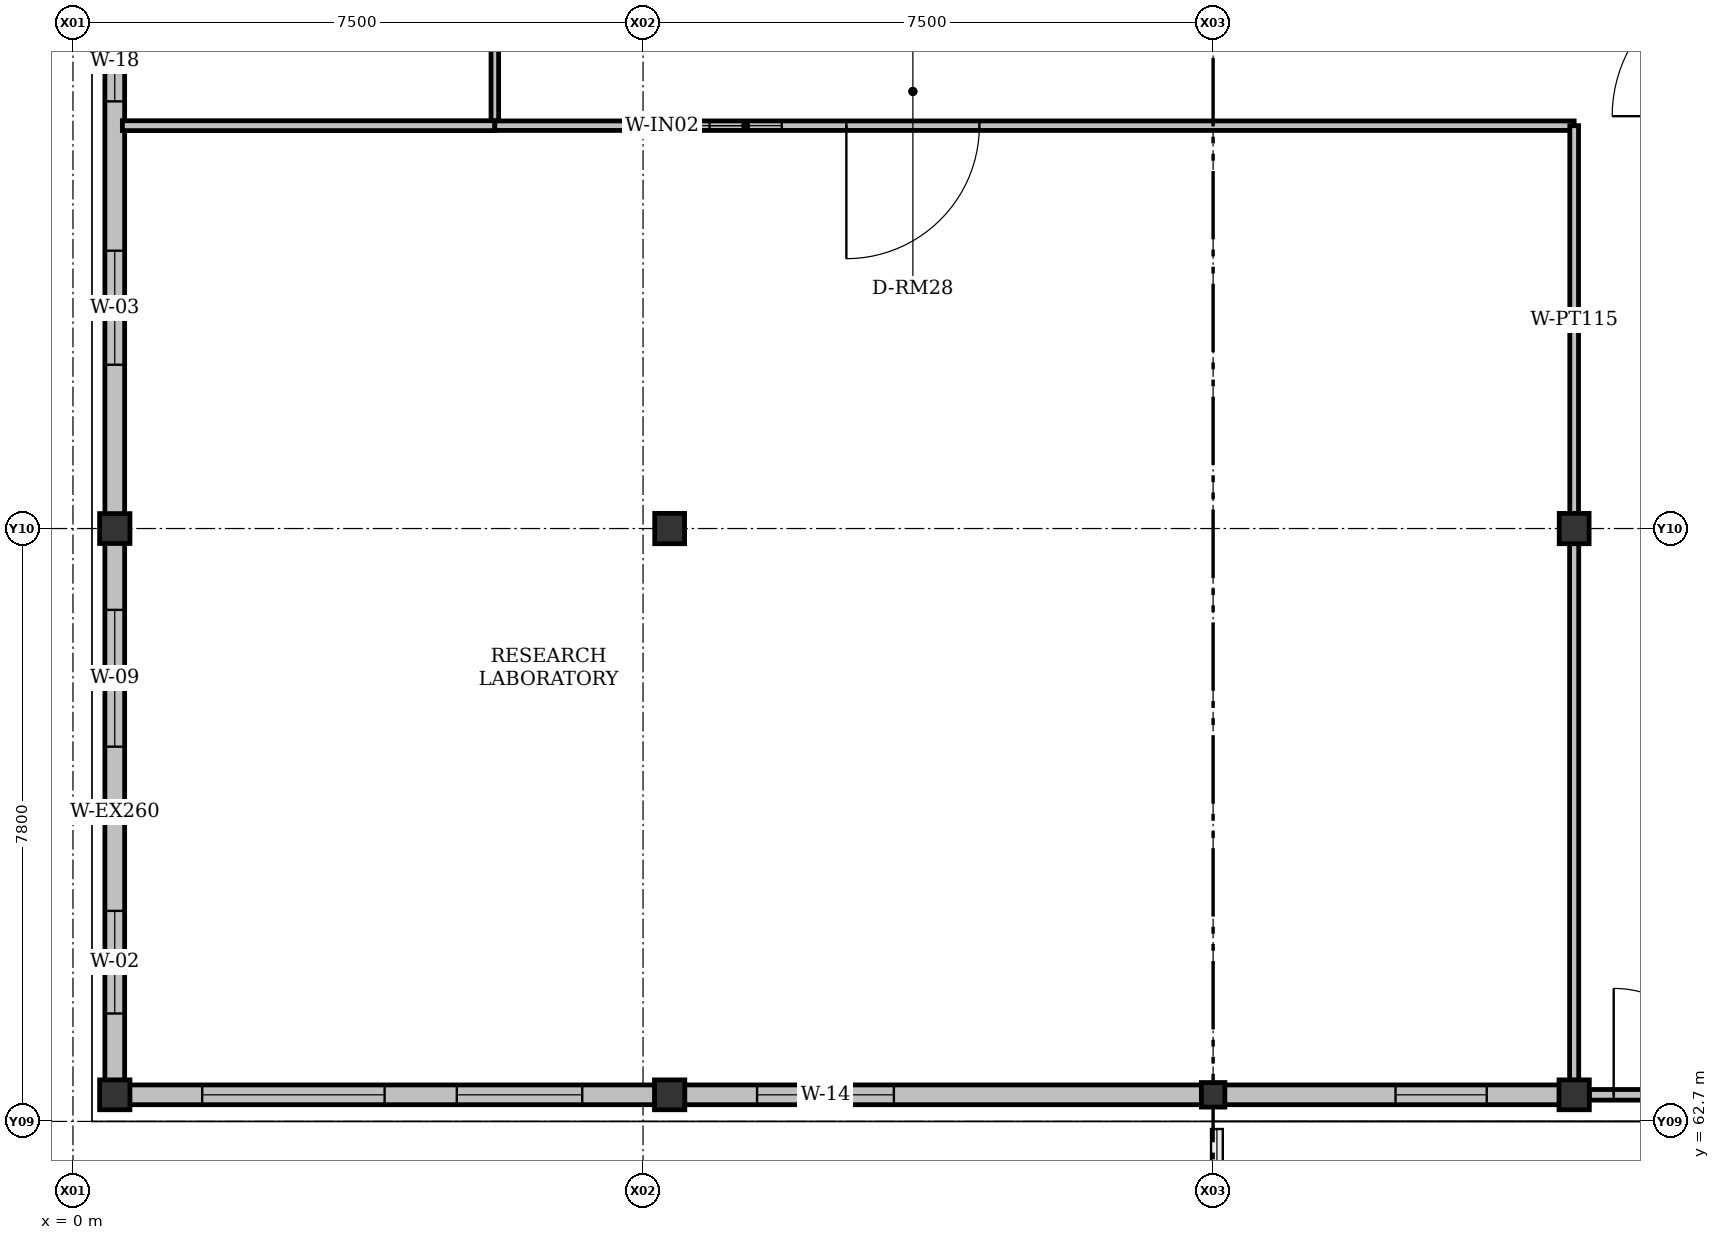
"""IFC4 building model, lengths in metres.
Left out: names, types, materials, properties, quantities, classifications, styles, units other than length and angle.
Written with IfcOpenShell. Run it as: python <this file> out.ifc"""

import sys

from ifc_helpers import new_model, si_unit, direction, frame, frame_2d, origin, origin_2d, place, context, subcontext, project, spatial, rectangle, i_section, extrude, element, fill, save


model = new_model("IFC4")
c1 = context("Model", 3, precision=1e-05, world=origin(), true_north=direction((0.0, 1.0)))
c2 = subcontext(c1, "Body", "Model", "MODEL_VIEW")
j1 = project(units=[si_unit("LENGTHUNIT", "METRE"), si_unit("PLANEANGLEUNIT", "RADIAN")], contexts=[c1])
p1 = place(None, origin())
s1 = spatial("IfcSite", under=j1, at=p1, CompositionType="ELEMENT")
p2 = place(p1, origin())
s2 = spatial("IfcBuilding", under=s1, at=p2, CompositionType="ELEMENT")
p3 = place(p2, frame((0.0, 0.0, 5.4)))
s3 = spatial("IfcBuildingStorey", under=s2, at=p3, CompositionType="ELEMENT", Elevation=5.4)
for number, where, z_axis, x_axis in (
    (1, (0.55, 63.05, 0.0), (0.0, 0.0, 1.0), (1.0, 0.0, 0.0)),
    (2, (7.85, 63.05, 0.0), (0.0, 0.0, 1.0), (1.0, 0.0, 0.0)),
    (3, (19.75, 63.05, 0.0), (0.0, 0.0, 1.0), (1.0, 0.0, 0.0)),
    (4, (0.55, 70.5, 0.0), (0.0, 0.0, 1.0), (1.0, 0.0, 0.0)),
    (5, (7.85, 70.5, 0.0), (0.0, 0.0, 1.0), (0.0, 1.0, 0.0)),
    (6, (19.75, 70.5, 0.0), (0.0, 0.0, 1.0), (0.0, 1.0, 0.0)),
):
    element("IfcColumn", number, at=place(p3, frame(where, z_axis=z_axis, x_axis=x_axis)), inside=s3, PredefinedType="COLUMN", context=c2, shape_type="SweptSolid", body=[
        extrude(i_section(OverallWidth=0.399, OverallDepth=0.393, WebThickness=0.023, FlangeThickness=0.036, FilletRadius=0.015, at=origin_2d()), origin(), (0.0, 0.0, 1.0), 4.5),
    ])
p4 = place(p3, frame((15.0, 63.05, 0.0), z_axis=(0.0, 0.0, 1.0), x_axis=(1.0, 0.0, 0.0)))
e7 = element("IfcColumn", 7, at=p4, inside=s3, PredefinedType="COLUMN", context=c2, shape_type="SweptSolid", body=[
    extrude(i_section(OverallWidth=0.309, OverallDepth=0.323, WebThickness=0.014, FlangeThickness=0.023, FilletRadius=0.015, at=origin_2d()), origin(), (0.0, 0.0, 1.0), 4.5),
])
p5 = place(p3, frame((0.55, 63.05, 0.0), z_axis=(0.0, 0.0, 1.0), x_axis=(0.0, 1.0, 0.0)))
e8 = element("IfcWall", 8, at=p5, inside=s3, PredefinedType="SOLIDWALL", context=c2, shape_type="SweptSolid", body=[
    extrude(rectangle(XDim=7.45, YDim=0.26, at=frame_2d((3.725, 0.0))), origin(), (0.0, 0.0, 1.0), 3.847),
])
p6 = place(p5, frame((1.07, 0.0, 0.92)))
e9 = element("IfcOpeningElement", 9, at=p6, cuts=e8, PredefinedType="OPENING", context=c2, shape_type="SweptSolid", body=[
    extrude(rectangle(XDim=1.35, YDim=1.4, at=frame_2d((0.675, 0.7))), frame((0.0, 0.13, 0.0), z_axis=(0.0, -1.0, 0.0), x_axis=(1.0, 0.0, 0.0)), (0.0, 0.0, 1.0), 0.26),
])
p7 = place(p5, frame((4.58, 0.0, 0.92)))
e10 = element("IfcOpeningElement", 10, at=p7, cuts=e8, PredefinedType="OPENING", context=c2, shape_type="SweptSolid", body=[
    extrude(rectangle(XDim=1.8, YDim=1.55, at=frame_2d((0.9, 0.775))), frame((0.0, 0.13, 0.0), z_axis=(0.0, -1.0, 0.0), x_axis=(1.0, 0.0, 0.0)), (0.0, 0.0, 1.0), 0.26),
])
p8 = place(p3, frame((0.55, 70.5, 0.0), z_axis=(0.0, 0.0, 1.0), x_axis=(0.0, 1.0, 0.0)))
e11 = element("IfcWall", 11, at=p8, inside=s3, PredefinedType="SOLIDWALL", context=c2, shape_type="SweptSolid", body=[
    extrude(rectangle(XDim=7.5, YDim=0.26, at=frame_2d((3.75, 0.0))), origin(), (0.0, 0.0, 1.0), 3.847),
])
p9 = place(p8, frame((2.155, 0.0, 0.92)))
e12 = element("IfcOpeningElement", 12, at=p9, cuts=e11, PredefinedType="OPENING", context=c2, shape_type="SweptSolid", body=[
    extrude(rectangle(XDim=1.5, YDim=1.4, at=frame_2d((0.75, 0.7))), frame((0.0, 0.13, 0.0), z_axis=(0.0, -1.0, 0.0), x_axis=(1.0, 0.0, 0.0)), (0.0, 0.0, 1.0), 0.26),
])
p10 = place(p8, frame((5.62, 0.0, 0.92)))
e13 = element("IfcOpeningElement", 13, at=p10, cuts=e11, PredefinedType="OPENING", context=c2, shape_type="SweptSolid", body=[
    extrude(rectangle(XDim=1.05, YDim=1.3, at=frame_2d((0.525, 0.65))), frame((0.0, 0.13, 0.0), z_axis=(0.0, -1.0, 0.0), x_axis=(1.0, 0.0, 0.0)), (0.0, 0.0, 1.0), 0.26),
])
p11 = place(p3, frame((7.85, 63.05, 0.0), z_axis=(0.0, 0.0, 1.0), x_axis=(-1.0, 0.0, 0.0)))
e14 = element("IfcWall", 14, at=p11, inside=s3, PredefinedType="SOLIDWALL", context=c2, shape_type="SweptSolid", body=[
    extrude(rectangle(XDim=7.3, YDim=0.26, at=frame_2d((3.65, 0.0))), origin(), (0.0, 0.0, 1.0), 3.847),
])
p12 = place(p11, frame((1.15, 0.0, 0.92)))
e15 = element("IfcOpeningElement", 15, at=p12, cuts=e14, PredefinedType="OPENING", context=c2, shape_type="SweptSolid", body=[
    extrude(rectangle(XDim=1.65, YDim=1.4, at=frame_2d((0.825, 0.7))), frame((0.0, 0.13, 0.0), z_axis=(0.0, -1.0, 0.0), x_axis=(1.0, 0.0, 0.0)), (0.0, 0.0, 1.0), 0.26),
])
p13 = place(p11, frame((3.75, 0.0, 0.92)))
e16 = element("IfcOpeningElement", 16, at=p13, cuts=e14, PredefinedType="OPENING", context=c2, shape_type="SweptSolid", body=[
    extrude(rectangle(XDim=2.4, YDim=1.55, at=frame_2d((1.2, 0.775))), frame((0.0, 0.13, 0.0), z_axis=(0.0, -1.0, 0.0), x_axis=(1.0, 0.0, 0.0)), (0.0, 0.0, 1.0), 0.26),
])
p14 = place(p3, frame((19.75, 63.05, 0.0), z_axis=(0.0, 0.0, 1.0), x_axis=(-1.0, 0.0, 0.0)))
e17 = element("IfcWall", 17, at=p14, inside=s3, PredefinedType="SOLIDWALL", context=c2, shape_type="SweptSolid", body=[
    extrude(rectangle(XDim=11.9, YDim=0.26, at=frame_2d((5.95, 0.0))), origin(), (0.0, 0.0, 1.0), 3.847),
])
p15 = place(p14, frame((1.15, 0.0, 0.92)))
e18 = element("IfcOpeningElement", 18, at=p15, cuts=e17, PredefinedType="OPENING", context=c2, shape_type="SweptSolid", body=[
    extrude(rectangle(XDim=1.2, YDim=1.55, at=frame_2d((0.6, 0.775))), frame((0.0, 0.13, 0.0), z_axis=(0.0, -1.0, 0.0), x_axis=(1.0, 0.0, 0.0)), (0.0, 0.0, 1.0), 0.26),
])
p16 = place(p14, frame((8.95, 0.0, 0.92)))
e19 = element("IfcOpeningElement", 19, at=p16, cuts=e17, PredefinedType="OPENING", context=c2, shape_type="SweptSolid", body=[
    extrude(rectangle(XDim=1.8, YDim=1.7, at=frame_2d((0.9, 0.85))), frame((0.0, 0.13, 0.0), z_axis=(0.0, -1.0, 0.0), x_axis=(1.0, 0.0, 0.0)), (0.0, 0.0, 1.0), 0.26),
])
p17 = place(p3, frame((5.55, 75.8, 0.0), z_axis=(0.0, 0.0, 1.0), x_axis=(0.0, 1.0, 0.0)))
e20 = element("IfcWall", 20, at=p17, inside=s3, PredefinedType="PARTITIONING", context=c2, shape_type="SweptSolid", body=[
    extrude(rectangle(XDim=27.8, YDim=0.1, at=frame_2d((13.9, 0.0))), origin(), (0.0, 0.0, 1.0), 3.721),
])
p18 = place(p17, frame((13.26, 0.0, 0.0)))
e21 = element("IfcOpeningElement", 21, at=p18, cuts=e20, PredefinedType="OPENING", context=c2, shape_type="SweptSolid", body=[
    extrude(rectangle(XDim=1.28, YDim=2.25, at=frame_2d((0.64, 1.125))), frame((0.0, 0.05, 0.0), z_axis=(0.0, -1.0, 0.0), x_axis=(1.0, 0.0, 0.0)), (0.0, 0.0, 1.0), 0.1),
])
p19 = place(p17, frame((15.39, 0.0, 0.92)))
e22 = element("IfcOpeningElement", 22, at=p19, cuts=e20, PredefinedType="OPENING", context=c2, shape_type="SweptSolid", body=[
    extrude(rectangle(XDim=1.45, YDim=1.3, at=frame_2d((0.725, 0.65))), frame((0.0, 0.05, 0.0), z_axis=(0.0, -1.0, 0.0), x_axis=(1.0, 0.0, 0.0)), (0.0, 0.0, 1.0), 0.1),
])
p20 = place(p3, frame((19.95, 63.05, 0.0), z_axis=(0.0, 0.0, 1.0), x_axis=(1.0, 0.0, 0.0)))
e23 = element("IfcWall", 23, at=p20, inside=s3, PredefinedType="PARTITIONING", context=c2, shape_type="SweptSolid", body=[
    extrude(rectangle(XDim=2.04, YDim=0.14, at=frame_2d((1.02, 0.0))), origin(), (0.0, 0.0, 1.0), 3.847),
])
p21 = place(p20, frame((0.32, 0.0, 0.0)))
e24 = element("IfcOpeningElement", 24, at=p21, cuts=e23, PredefinedType="OPENING", context=c2, shape_type="SweptSolid", body=[
    extrude(rectangle(XDim=1.4, YDim=2.25, at=frame_2d((0.7, 1.125))), frame((0.0, 0.07, 0.0), z_axis=(0.0, -1.0, 0.0), x_axis=(1.0, 0.0, 0.0)), (0.0, 0.0, 1.0), 0.14),
])
p22 = place(p3, frame((0.65, 75.8, 0.0), z_axis=(0.0, 0.0, 1.0), x_axis=(1.0, 0.0, 0.0)))
e25 = element("IfcWall", 25, at=p22, inside=s3, PredefinedType="PARTITIONING", context=c2, shape_type="SweptSolid", body=[
    extrude(rectangle(XDim=4.9, YDim=0.13, at=frame_2d((2.45, 0.0))), origin(), (0.0, 0.0, 1.0), 4.25),
])
p23 = place(p3, frame((19.75, 75.8, 0.0), z_axis=(0.0, 0.0, 1.0), x_axis=(-1.0, 0.0, 0.0)))
e26 = element("IfcWall", 26, at=p23, inside=s3, PredefinedType="PARTITIONING", context=c2, shape_type="SweptSolid", body=[
    extrude(rectangle(XDim=14.2, YDim=0.125, at=frame_2d((7.1, 0.0))), origin(), (0.0, 0.0, 1.0), 3.797),
])
p24 = place(p23, frame((7.825, 0.0, 0.0)))
e27 = element("IfcOpeningElement", 27, at=p24, cuts=e26, PredefinedType="OPENING", context=c2, shape_type="SweptSolid", body=[
    extrude(rectangle(XDim=1.75, YDim=2.35, at=frame_2d((0.875, 1.175))), frame((0.0, 0.062, 0.0), z_axis=(0.0, -1.0, 0.0), x_axis=(1.0, 0.0, 0.0)), (0.0, 0.0, 1.0), 0.125),
])
p25 = place(p23, frame((10.425, 0.0, 0.92)))
e28 = element("IfcOpeningElement", 28, at=p25, cuts=e26, PredefinedType="OPENING", context=c2, shape_type="SweptSolid", body=[
    extrude(rectangle(XDim=0.95, YDim=1.1, at=frame_2d((0.475, 0.55))), frame((0.0, 0.062, 0.0), z_axis=(0.0, -1.0, 0.0), x_axis=(1.0, 0.0, 0.0)), (0.0, 0.0, 1.0), 0.125),
])
p26 = place(p3, frame((19.75, 63.241, 0.0), z_axis=(0.0, 0.0, 1.0), x_axis=(0.0, 1.0, 0.0)))
e29 = element("IfcWall", 29, at=p26, inside=s3, PredefinedType="PARTITIONING", context=c2, shape_type="SweptSolid", body=[
    extrude(rectangle(XDim=7.064, YDim=0.12, at=frame_2d((3.532, 0.0))), origin(), (0.0, 0.0, 1.0), 3.797),
])
p27 = place(p3, frame((19.75, 70.695, 0.0), z_axis=(0.0, 0.0, 1.0), x_axis=(0.0, 1.0, 0.0)))
e30 = element("IfcWall", 30, at=p27, inside=s3, PredefinedType="PARTITIONING", context=c2, shape_type="SweptSolid", body=[
    extrude(rectangle(XDim=5.105, YDim=0.115, at=frame_2d((2.553, 0.0))), origin(), (0.0, 0.0, 1.0), 3.797),
])
p28 = place(p6, origin())
e31 = element("IfcWindow", 31, at=p28, inside=s3, PartitioningType="SINGLE_PANEL", PredefinedType="WINDOW", context=c2, shape_type="SweptSolid", body=[
    extrude(rectangle(XDim=1.35, YDim=1.4, at=frame_2d((0.675, 0.7))), frame((0.0, 0.03, 0.0), z_axis=(0.0, -1.0, 0.0), x_axis=(1.0, 0.0, 0.0)), (0.0, 0.0, 1.0), 0.06),
])
fill(e9, e31)
p29 = place(p7, origin())
e32 = element("IfcWindow", 32, at=p29, inside=s3, PartitioningType="DOUBLE_PANEL_VERTICAL", PredefinedType="WINDOW", context=c2, shape_type="SweptSolid", body=[
    extrude(rectangle(XDim=1.8, YDim=1.55, at=frame_2d((0.9, 0.775))), frame((0.0, 0.03, 0.0), z_axis=(0.0, -1.0, 0.0), x_axis=(1.0, 0.0, 0.0)), (0.0, 0.0, 1.0), 0.06),
])
fill(e10, e32)
p30 = place(p9, origin())
e33 = element("IfcWindow", 33, at=p30, inside=s3, PartitioningType="SINGLE_PANEL", PredefinedType="WINDOW", context=c2, shape_type="SweptSolid", body=[
    extrude(rectangle(XDim=1.5, YDim=1.4, at=frame_2d((0.75, 0.7))), frame((0.0, 0.03, 0.0), z_axis=(0.0, -1.0, 0.0), x_axis=(1.0, 0.0, 0.0)), (0.0, 0.0, 1.0), 0.06),
])
fill(e12, e33)
p31 = place(p10, origin())
e34 = element("IfcWindow", 34, at=p31, inside=s3, PartitioningType="SINGLE_PANEL", PredefinedType="WINDOW", context=c2, shape_type="SweptSolid", body=[
    extrude(rectangle(XDim=1.05, YDim=1.3, at=frame_2d((0.525, 0.65))), frame((0.0, 0.03, 0.0), z_axis=(0.0, -1.0, 0.0), x_axis=(1.0, 0.0, 0.0)), (0.0, 0.0, 1.0), 0.06),
])
fill(e13, e34)
p32 = place(p12, origin())
e35 = element("IfcWindow", 35, at=p32, inside=s3, PartitioningType="DOUBLE_PANEL_VERTICAL", PredefinedType="WINDOW", context=c2, shape_type="SweptSolid", body=[
    extrude(rectangle(XDim=1.65, YDim=1.4, at=frame_2d((0.825, 0.7))), frame((0.0, 0.03, 0.0), z_axis=(0.0, -1.0, 0.0), x_axis=(1.0, 0.0, 0.0)), (0.0, 0.0, 1.0), 0.06),
])
fill(e15, e35)
p33 = place(p13, origin())
e36 = element("IfcWindow", 36, at=p33, inside=s3, PartitioningType="DOUBLE_PANEL_VERTICAL", PredefinedType="WINDOW", context=c2, shape_type="SweptSolid", body=[
    extrude(rectangle(XDim=2.4, YDim=1.55, at=frame_2d((1.2, 0.775))), frame((0.0, 0.03, 0.0), z_axis=(0.0, -1.0, 0.0), x_axis=(1.0, 0.0, 0.0)), (0.0, 0.0, 1.0), 0.06),
])
fill(e16, e36)
p34 = place(p15, origin())
e37 = element("IfcWindow", 37, at=p34, inside=s3, PartitioningType="SINGLE_PANEL", PredefinedType="WINDOW", context=c2, shape_type="SweptSolid", body=[
    extrude(rectangle(XDim=1.2, YDim=1.55, at=frame_2d((0.6, 0.775))), frame((0.0, 0.03, 0.0), z_axis=(0.0, -1.0, 0.0), x_axis=(1.0, 0.0, 0.0)), (0.0, 0.0, 1.0), 0.06),
])
fill(e18, e37)
p35 = place(p16, origin())
e38 = element("IfcWindow", 38, at=p35, inside=s3, PartitioningType="DOUBLE_PANEL_VERTICAL", PredefinedType="WINDOW", context=c2, shape_type="SweptSolid", body=[
    extrude(rectangle(XDim=1.8, YDim=1.7, at=frame_2d((0.9, 0.85))), frame((0.0, 0.03, 0.0), z_axis=(0.0, -1.0, 0.0), x_axis=(1.0, 0.0, 0.0)), (0.0, 0.0, 1.0), 0.06),
])
fill(e19, e38)
p36 = place(p21, origin())
e39 = element("IfcDoor", 39, at=p36, inside=s3, OperationType="SINGLE_SWING_LEFT", PredefinedType="DOOR", context=c2, shape_type="SweptSolid", body=[
    extrude(rectangle(XDim=1.4, YDim=2.25, at=frame_2d((0.7, 1.125))), frame((0.0, 0.025, 0.0), z_axis=(0.0, -1.0, 0.0), x_axis=(1.0, 0.0, 0.0)), (0.0, 0.0, 1.0), 0.05),
])
fill(e24, e39)
p37 = place(p24, origin())
e40 = element("IfcDoor", 40, at=p37, inside=s3, OperationType="SINGLE_SWING_RIGHT", PredefinedType="DOOR", context=c2, shape_type="SweptSolid", body=[
    extrude(rectangle(XDim=1.75, YDim=2.35, at=frame_2d((0.875, 1.175))), frame((0.0, 0.025, 0.0), z_axis=(0.0, -1.0, 0.0), x_axis=(1.0, 0.0, 0.0)), (0.0, 0.0, 1.0), 0.05),
])
fill(e27, e40)
p38 = place(p25, origin())
e41 = element("IfcWindow", 41, at=p38, inside=s3, PartitioningType="SINGLE_PANEL", PredefinedType="WINDOW", context=c2, shape_type="SweptSolid", body=[
    extrude(rectangle(XDim=0.95, YDim=1.1, at=frame_2d((0.475, 0.55))), frame((0.0, 0.03, 0.0), z_axis=(0.0, -1.0, 0.0), x_axis=(1.0, 0.0, 0.0)), (0.0, 0.0, 1.0), 0.06),
])
fill(e28, e41)
save(model, sys.argv[1])
